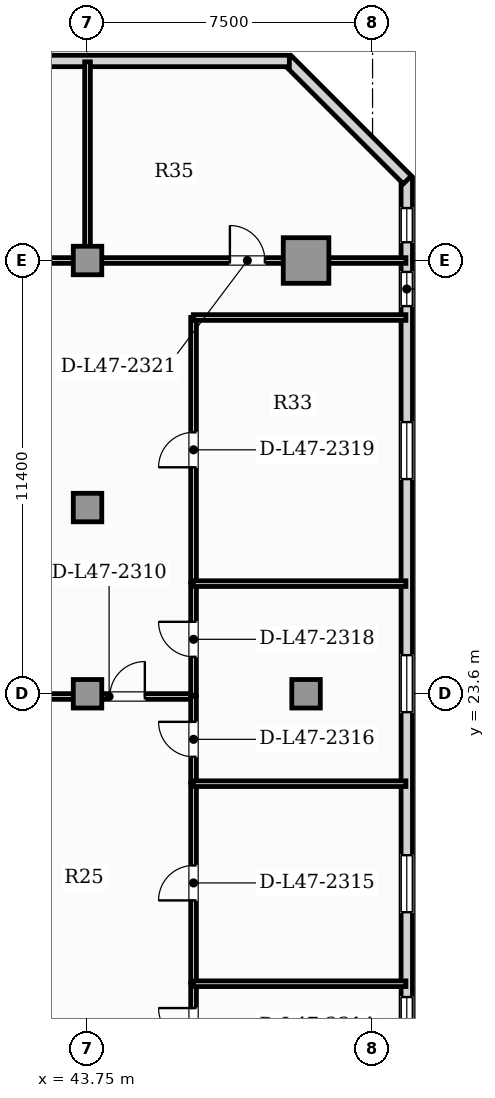
"""IFC4 building model, lengths in metres.
Left out: names, types, materials, properties, quantities, classifications, styles, units other than length and angle.
Written with IfcOpenShell. Run it as: python <this file> out.ifc"""

import sys

from ifc_helpers import new_model, si_unit, direction, frame, frame_2d, origin, origin_2d, place, context, subcontext, project, spatial, rectangle, hollow_rectangle, extrude, element, fill, save


model = new_model("IFC4")
c1 = context("Model", 3, precision=1e-05, world=origin(), true_north=direction((0.0, 1.0)))
c2 = subcontext(c1, "Body", "Model", "MODEL_VIEW")
j1 = project(units=[si_unit("LENGTHUNIT", "METRE"), si_unit("PLANEANGLEUNIT", "RADIAN")], contexts=[c1])
p1 = place(None, origin())
s1 = spatial("IfcSite", under=j1, at=p1, CompositionType="ELEMENT")
p2 = place(p1, origin())
s2 = spatial("IfcBuilding", under=s1, at=p2, CompositionType="ELEMENT")
p3 = place(p2, frame((0.0, 0.0, 192.6)))
s3 = spatial("IfcBuildingStorey", under=s2, at=p3, CompositionType="ELEMENT", Elevation=192.6)
p4 = place(p3, frame((49.5, 35.0, 0.0), z_axis=(0.0, 0.0, 1.0), x_axis=(1.0, 0.0, 0.0)))
e1 = element("IfcColumn", 1, at=p4, inside=s3, PredefinedType="USERDEFINED", context=c2, shape_type="SweptSolid", body=[
    extrude(hollow_rectangle(XDim=1.2, YDim=1.2, WallThickness=0.07, at=origin_2d()), origin(), (0.0, 0.0, 1.0), 3.85),
])
for number, where, z_axis, x_axis in (
    (2, (43.75, 23.6, 0.0), (0.0, 0.0, 1.0), (1.0, 0.0, 0.0)),
    (3, (49.5, 23.6, 0.0), (0.0, 0.0, 1.0), (1.0, 0.0, 0.0)),
    (4, (43.75, 28.5, 0.0), (0.0, 0.0, 1.0), (1.0, 0.0, 0.0)),
    (5, (43.75, 35.0, 0.0), (0.0, 0.0, 1.0), (1.0, 0.0, 0.0)),
):
    element("IfcColumn", number, at=place(p3, frame(where, z_axis=z_axis, x_axis=x_axis)), inside=s3, PredefinedType="COLUMN", context=c2, shape_type="SweptSolid", body=[
        extrude(rectangle(XDim=0.75, YDim=0.75, at=origin_2d()), origin(), (0.0, 0.0, 1.0), 3.85),
    ])
p5 = place(p3, frame((52.15, 3.24, 0.0), z_axis=(0.0, 0.0, 1.0), x_axis=(0.0, 1.0, 0.0)))
e6 = element("IfcWall", 6, at=p5, inside=s3, PredefinedType="SOLIDWALL", context=c2, shape_type="SweptSolid", body=[
    extrude(rectangle(XDim=33.92, YDim=0.3, at=frame_2d((16.96, 0.0))), origin(), (0.0, 0.0, 1.0), 3.63),
])
p6 = place(p5, frame((30.56, 0.0, 0.95)))
e7 = element("IfcOpeningElement", 7, at=p6, cuts=e6, PredefinedType="OPENING", context=c2, shape_type="SweptSolid", body=[
    extrude(rectangle(XDim=0.9, YDim=1.5, at=frame_2d((0.45, 0.75))), frame((0.0, 0.16, 0.0), z_axis=(0.0, -1.0, 0.0), x_axis=(1.0, 0.0, 0.0)), (0.0, 0.0, 1.0), 0.32),
])
p7 = place(p5, frame((10.88, 0.0, 0.9)))
e8 = element("IfcOpeningElement", 8, at=p7, cuts=e6, PredefinedType="OPENING", context=c2, shape_type="SweptSolid", body=[
    extrude(rectangle(XDim=1.5, YDim=1.95, at=frame_2d((0.75, 0.975))), frame((0.0, 0.16, 0.0), z_axis=(0.0, -1.0, 0.0), x_axis=(1.0, 0.0, 0.0)), (0.0, 0.0, 1.0), 0.32),
])
p8 = place(p5, frame((14.613, 0.0, 0.9)))
e9 = element("IfcOpeningElement", 9, at=p8, cuts=e6, PredefinedType="OPENING", context=c2, shape_type="SweptSolid", body=[
    extrude(rectangle(XDim=1.5, YDim=1.95, at=frame_2d((0.75, 0.975))), frame((0.0, 0.16, 0.0), z_axis=(0.0, -1.0, 0.0), x_axis=(1.0, 0.0, 0.0)), (0.0, 0.0, 1.0), 0.32),
])
p9 = place(p5, frame((19.876, 0.0, 0.9)))
e10 = element("IfcOpeningElement", 10, at=p9, cuts=e6, PredefinedType="OPENING", context=c2, shape_type="SweptSolid", body=[
    extrude(rectangle(XDim=1.5, YDim=1.95, at=frame_2d((0.75, 0.975))), frame((0.0, 0.16, 0.0), z_axis=(0.0, -1.0, 0.0), x_axis=(1.0, 0.0, 0.0)), (0.0, 0.0, 1.0), 0.32),
])
p10 = place(p5, frame((26.009, 0.0, 0.9)))
e11 = element("IfcOpeningElement", 11, at=p10, cuts=e6, PredefinedType="OPENING", context=c2, shape_type="SweptSolid", body=[
    extrude(rectangle(XDim=1.5, YDim=1.95, at=frame_2d((0.75, 0.975))), frame((0.0, 0.16, 0.0), z_axis=(0.0, -1.0, 0.0), x_axis=(1.0, 0.0, 0.0)), (0.0, 0.0, 1.0), 0.32),
])
p11 = place(p5, frame((32.24, 0.0, 0.95)))
e12 = element("IfcOpeningElement", 12, at=p11, cuts=e6, PredefinedType="OPENING", context=c2, shape_type="SweptSolid", body=[
    extrude(rectangle(XDim=0.9, YDim=1.5, at=frame_2d((0.45, 0.75))), frame((0.0, 0.16, 0.0), z_axis=(0.0, -1.0, 0.0), x_axis=(1.0, 0.0, 0.0)), (0.0, 0.0, 1.0), 0.32),
])
p12 = place(p3, frame((52.166, 37.122, 0.0), z_axis=(0.0, 0.0, 1.0), x_axis=(-0.707106781187, 0.707106781187, 0.0)))
e13 = element("IfcWall", 13, at=p12, inside=s3, PredefinedType="SOLIDWALL", context=c2, shape_type="SweptSolid", body=[
    extrude(rectangle(XDim=4.445, YDim=0.3, at=frame_2d((2.223, 0.0))), origin(), (0.0, 0.0, 1.0), 3.63),
])
p13 = place(p3, frame((49.06, 40.25, 0.0), z_axis=(0.0, 0.0, 1.0), x_axis=(-1.0, 0.0, 0.0)))
e14 = element("IfcWall", 14, at=p13, inside=s3, PredefinedType="SOLIDWALL", context=c2, shape_type="SweptSolid", body=[
    extrude(rectangle(XDim=12.67, YDim=0.3, at=frame_2d((6.335, 0.0))), origin(), (0.0, 0.0, 1.0), 3.63),
])
p14 = place(p13, frame((7.584, 0.0, 0.9)))
e15 = element("IfcOpeningElement", 15, at=p14, cuts=e14, PredefinedType="OPENING", context=c2, shape_type="SweptSolid", body=[
    extrude(rectangle(XDim=1.5, YDim=1.95, at=frame_2d((0.75, 0.975))), frame((0.0, 0.16, 0.0), z_axis=(0.0, -1.0, 0.0), x_axis=(1.0, 0.0, 0.0)), (0.0, 0.0, 1.0), 0.32),
])
p15 = place(p3, frame((41.555, 23.528, 0.0), z_axis=(0.0, 0.0, 1.0), x_axis=(1.0, 0.0, 0.0)))
e16 = element("IfcWall", 16, at=p15, inside=s3, PredefinedType="PARTITIONING", context=c2, shape_type="SweptSolid", body=[
    extrude(rectangle(XDim=4.99, YDim=0.15, at=frame_2d((2.495, 0.0))), origin(), (0.0, 0.0, 1.0), 3.085),
])
p16 = place(p15, frame((2.783, 0.0, 0.0)))
e17 = element("IfcOpeningElement", 17, at=p16, cuts=e16, PredefinedType="OPENING", context=c2, shape_type="SweptSolid", body=[
    extrude(rectangle(XDim=0.92, YDim=2.1, at=frame_2d((0.46, 1.05))), frame((0.0, 0.085, 0.0), z_axis=(0.0, -1.0, 0.0), x_axis=(1.0, 0.0, 0.0)), (0.0, 0.0, 1.0), 0.17),
])
p17 = place(p3, frame((46.54, 13.765, 0.0), z_axis=(0.0, 0.0, 1.0), x_axis=(0.0, 1.0, 0.0)))
e18 = element("IfcWall", 18, at=p17, inside=s3, PredefinedType="PARTITIONING", context=c2, shape_type="SweptSolid", body=[
    extrude(rectangle(XDim=2.211, YDim=0.15, at=frame_2d((1.105, 0.0))), origin(), (0.0, 0.0, 1.0), 3.63),
])
p18 = place(p17, frame((0.646, 0.0, 0.0)))
e19 = element("IfcOpeningElement", 19, at=p18, cuts=e18, PredefinedType="OPENING", context=c2, shape_type="SweptSolid", body=[
    extrude(rectangle(XDim=0.92, YDim=2.1, at=frame_2d((0.46, 1.05))), frame((0.0, 0.085, 0.0), z_axis=(0.0, -1.0, 0.0), x_axis=(1.0, 0.0, 0.0)), (0.0, 0.0, 1.0), 0.17),
])
p19 = place(p3, frame((46.54, 16.006, 0.0), z_axis=(0.0, 0.0, 1.0), x_axis=(0.0, 1.0, 0.0)))
e20 = element("IfcWall", 20, at=p19, inside=s3, PredefinedType="PARTITIONING", context=c2, shape_type="SweptSolid", body=[
    extrude(rectangle(XDim=5.234, YDim=0.15, at=frame_2d((2.617, 0.0))), origin(), (0.0, 0.0, 1.0), 3.63),
])
p20 = place(p19, frame((2.157, 0.0, 0.0)))
e21 = element("IfcOpeningElement", 21, at=p20, cuts=e20, PredefinedType="OPENING", context=c2, shape_type="SweptSolid", body=[
    extrude(rectangle(XDim=0.92, YDim=2.1, at=frame_2d((0.46, 1.05))), frame((0.0, 0.085, 0.0), z_axis=(0.0, -1.0, 0.0), x_axis=(1.0, 0.0, 0.0)), (0.0, 0.0, 1.0), 0.17),
])
p21 = place(p3, frame((46.54, 21.27, 0.0), z_axis=(0.0, 0.0, 1.0), x_axis=(0.0, 1.0, 0.0)))
e22 = element("IfcWall", 22, at=p21, inside=s3, PredefinedType="PARTITIONING", context=c2, shape_type="SweptSolid", body=[
    extrude(rectangle(XDim=2.264, YDim=0.15, at=frame_2d((1.132, 0.0))), origin(), (0.0, 0.0, 1.0), 3.63),
])
p22 = place(p21, frame((0.672, 0.0, 0.0)))
e23 = element("IfcOpeningElement", 23, at=p22, cuts=e22, PredefinedType="OPENING", context=c2, shape_type="SweptSolid", body=[
    extrude(rectangle(XDim=0.92, YDim=2.1, at=frame_2d((0.46, 1.05))), frame((0.0, 0.085, 0.0), z_axis=(0.0, -1.0, 0.0), x_axis=(1.0, 0.0, 0.0)), (0.0, 0.0, 1.0), 0.17),
])
p23 = place(p3, frame((46.54, 23.563, 0.0), z_axis=(0.0, 0.0, 1.0), x_axis=(0.0, 1.0, 0.0)))
e24 = element("IfcWall", 24, at=p23, inside=s3, PredefinedType="PARTITIONING", context=c2, shape_type="SweptSolid", body=[
    extrude(rectangle(XDim=2.94, YDim=0.15, at=frame_2d((1.47, 0.0))), origin(), (0.0, 0.0, 1.0), 3.63),
])
p24 = place(p23, frame((1.01, 0.0, 0.0)))
e25 = element("IfcOpeningElement", 25, at=p24, cuts=e24, PredefinedType="OPENING", context=c2, shape_type="SweptSolid", body=[
    extrude(rectangle(XDim=0.92, YDim=2.1, at=frame_2d((0.46, 1.05))), frame((0.0, 0.085, 0.0), z_axis=(0.0, -1.0, 0.0), x_axis=(1.0, 0.0, 0.0)), (0.0, 0.0, 1.0), 0.17),
])
p25 = place(p3, frame((46.54, 26.533, 0.0), z_axis=(0.0, 0.0, 1.0), x_axis=(0.0, 1.0, 0.0)))
e26 = element("IfcWall", 26, at=p25, inside=s3, PredefinedType="PARTITIONING", context=c2, shape_type="SweptSolid", body=[
    extrude(rectangle(XDim=6.972, YDim=0.15, at=frame_2d((3.486, 0.0))), origin(), (0.0, 0.0, 1.0), 3.63),
])
p26 = place(p25, frame((3.026, 0.0, 0.0)))
e27 = element("IfcOpeningElement", 27, at=p26, cuts=e26, PredefinedType="OPENING", context=c2, shape_type="SweptSolid", body=[
    extrude(rectangle(XDim=0.92, YDim=2.1, at=frame_2d((0.46, 1.05))), frame((0.0, 0.085, 0.0), z_axis=(0.0, -1.0, 0.0), x_axis=(1.0, 0.0, 0.0)), (0.0, 0.0, 1.0), 0.17),
])
p27 = place(p3, frame((46.535, 33.5, 0.0), z_axis=(0.0, 0.0, 1.0), x_axis=(1.0, 0.0, 0.0)))
e28 = element("IfcWall", 28, at=p27, inside=s3, PredefinedType="PARTITIONING", context=c2, shape_type="SweptSolid", body=[
    extrude(rectangle(XDim=5.593, YDim=0.15, at=frame_2d((2.796, 0.0))), origin(), (0.0, 0.0, 1.0), 3.63),
])
p28 = place(p3, frame((36.685, 35.0, 0.0), z_axis=(0.0, 0.0, 1.0), x_axis=(1.0, 0.0, 0.0)))
e29 = element("IfcWall", 29, at=p28, inside=s3, PredefinedType="PARTITIONING", context=c2, shape_type="SweptSolid", body=[
    extrude(rectangle(XDim=7.07, YDim=0.15, at=frame_2d((3.535, 0.0))), origin(), (0.0, 0.0, 1.0), 3.085),
])
p29 = place(p28, frame((3.075, 0.0, 0.0)))
e30 = element("IfcOpeningElement", 30, at=p29, cuts=e29, PredefinedType="OPENING", context=c2, shape_type="SweptSolid", body=[
    extrude(rectangle(XDim=0.92, YDim=2.1, at=frame_2d((0.46, 1.05))), frame((0.0, 0.085, 0.0), z_axis=(0.0, -1.0, 0.0), x_axis=(1.0, 0.0, 0.0)), (0.0, 0.0, 1.0), 0.17),
])
p30 = place(p3, frame((43.785, 35.0, 0.0), z_axis=(0.0, 0.0, 1.0), x_axis=(1.0, 0.0, 0.0)))
e31 = element("IfcWall", 31, at=p30, inside=s3, PredefinedType="PARTITIONING", context=c2, shape_type="SweptSolid", body=[
    extrude(rectangle(XDim=8.343, YDim=0.15, at=frame_2d((4.171, 0.0))), origin(), (0.0, 0.0, 1.0), 3.085),
])
p31 = place(p30, frame((3.711, 0.0, 0.0)))
e32 = element("IfcOpeningElement", 32, at=p31, cuts=e31, PredefinedType="OPENING", context=c2, shape_type="SweptSolid", body=[
    extrude(rectangle(XDim=0.92, YDim=2.1, at=frame_2d((0.46, 1.05))), frame((0.0, 0.085, 0.0), z_axis=(0.0, -1.0, 0.0), x_axis=(1.0, 0.0, 0.0)), (0.0, 0.0, 1.0), 0.17),
])
for number, where, z_axis, x_axis in (
    (33, (46.535, 15.971, 0.0), (0.0, 0.0, 1.0), (1.0, 0.0, 0.0)),
    (34, (46.535, 21.235, 0.0), (0.0, 0.0, 1.0), (1.0, 0.0, 0.0)),
    (35, (46.535, 26.498, 0.0), (0.0, 0.0, 1.0), (1.0, 0.0, 0.0)),
):
    element("IfcWall", number, at=place(p3, frame(where, z_axis=z_axis, x_axis=x_axis)), inside=s3, PredefinedType="PARTITIONING", context=c2, shape_type="SweptSolid", body=[
        extrude(rectangle(XDim=5.593, YDim=0.15, at=frame_2d((2.796, 0.0))), origin(), (0.0, 0.0, 1.0), 3.63),
    ])
p32 = place(p3, frame((43.75, 34.995, 0.0), z_axis=(0.0, 0.0, 1.0), x_axis=(0.0, 1.0, 0.0)))
e36 = element("IfcWall", 36, at=p32, inside=s3, PredefinedType="PARTITIONING", context=c2, shape_type="SweptSolid", body=[
    extrude(rectangle(XDim=5.232, YDim=0.15, at=frame_2d((2.616, 0.0))), origin(), (0.0, 0.0, 1.0), 3.63),
])
p33 = place(p6, origin())
e37 = element("IfcWindow", 37, at=p33, inside=s3, PartitioningType="SINGLE_PANEL", PredefinedType="WINDOW", context=c2, shape_type="SweptSolid", body=[
    extrude(rectangle(XDim=0.9, YDim=1.5, at=frame_2d((0.45, 0.75))), frame((0.0, 0.03, 0.0), z_axis=(0.0, -1.0, 0.0), x_axis=(1.0, 0.0, 0.0)), (0.0, 0.0, 1.0), 0.06),
])
fill(e7, e37)
p34 = place(p7, origin())
e38 = element("IfcWindow", 38, at=p34, inside=s3, PartitioningType="SINGLE_PANEL", PredefinedType="WINDOW", context=c2, shape_type="SweptSolid", body=[
    extrude(rectangle(XDim=1.5, YDim=1.95, at=frame_2d((0.75, 0.975))), frame((0.0, 0.03, 0.0), z_axis=(0.0, -1.0, 0.0), x_axis=(1.0, 0.0, 0.0)), (0.0, 0.0, 1.0), 0.06),
])
fill(e8, e38)
p35 = place(p8, origin())
e39 = element("IfcWindow", 39, at=p35, inside=s3, PartitioningType="SINGLE_PANEL", PredefinedType="WINDOW", context=c2, shape_type="SweptSolid", body=[
    extrude(rectangle(XDim=1.5, YDim=1.95, at=frame_2d((0.75, 0.975))), frame((0.0, 0.03, 0.0), z_axis=(0.0, -1.0, 0.0), x_axis=(1.0, 0.0, 0.0)), (0.0, 0.0, 1.0), 0.06),
])
fill(e9, e39)
p36 = place(p9, origin())
e40 = element("IfcWindow", 40, at=p36, inside=s3, PartitioningType="SINGLE_PANEL", PredefinedType="WINDOW", context=c2, shape_type="SweptSolid", body=[
    extrude(rectangle(XDim=1.5, YDim=1.95, at=frame_2d((0.75, 0.975))), frame((0.0, 0.03, 0.0), z_axis=(0.0, -1.0, 0.0), x_axis=(1.0, 0.0, 0.0)), (0.0, 0.0, 1.0), 0.06),
])
fill(e10, e40)
p37 = place(p10, origin())
e41 = element("IfcWindow", 41, at=p37, inside=s3, PartitioningType="SINGLE_PANEL", PredefinedType="WINDOW", context=c2, shape_type="SweptSolid", body=[
    extrude(rectangle(XDim=1.5, YDim=1.95, at=frame_2d((0.75, 0.975))), frame((0.0, 0.03, 0.0), z_axis=(0.0, -1.0, 0.0), x_axis=(1.0, 0.0, 0.0)), (0.0, 0.0, 1.0), 0.06),
])
fill(e11, e41)
p38 = place(p11, origin())
e42 = element("IfcWindow", 42, at=p38, inside=s3, PartitioningType="SINGLE_PANEL", PredefinedType="WINDOW", context=c2, shape_type="SweptSolid", body=[
    extrude(rectangle(XDim=0.9, YDim=1.5, at=frame_2d((0.45, 0.75))), frame((0.0, 0.03, 0.0), z_axis=(0.0, -1.0, 0.0), x_axis=(1.0, 0.0, 0.0)), (0.0, 0.0, 1.0), 0.06),
])
fill(e12, e42)
p39 = place(p16, origin())
e43 = element("IfcDoor", 43, at=p39, inside=s3, OperationType="SINGLE_SWING_RIGHT", PredefinedType="DOOR", context=c2, shape_type="SweptSolid", body=[
    extrude(rectangle(XDim=0.92, YDim=2.1, at=frame_2d((0.46, 1.05))), frame((0.0, 0.025, 0.0), z_axis=(0.0, -1.0, 0.0), x_axis=(1.0, 0.0, 0.0)), (0.0, 0.0, 1.0), 0.05),
])
fill(e17, e43)
p40 = place(p18, origin())
e44 = element("IfcDoor", 44, at=p40, inside=s3, OperationType="SINGLE_SWING_RIGHT", PredefinedType="DOOR", context=c2, shape_type="SweptSolid", body=[
    extrude(rectangle(XDim=0.92, YDim=2.1, at=frame_2d((0.46, 1.05))), frame((0.0, 0.025, 0.0), z_axis=(0.0, -1.0, 0.0), x_axis=(1.0, 0.0, 0.0)), (0.0, 0.0, 1.0), 0.05),
])
fill(e19, e44)
p41 = place(p20, origin())
e45 = element("IfcDoor", 45, at=p41, inside=s3, OperationType="SINGLE_SWING_LEFT", PredefinedType="DOOR", context=c2, shape_type="SweptSolid", body=[
    extrude(rectangle(XDim=0.92, YDim=2.1, at=frame_2d((0.46, 1.05))), frame((0.0, 0.025, 0.0), z_axis=(0.0, -1.0, 0.0), x_axis=(1.0, 0.0, 0.0)), (0.0, 0.0, 1.0), 0.05),
])
fill(e21, e45)
p42 = place(p22, origin())
e46 = element("IfcDoor", 46, at=p42, inside=s3, OperationType="SINGLE_SWING_RIGHT", PredefinedType="DOOR", context=c2, shape_type="SweptSolid", body=[
    extrude(rectangle(XDim=0.92, YDim=2.1, at=frame_2d((0.46, 1.05))), frame((0.0, 0.025, 0.0), z_axis=(0.0, -1.0, 0.0), x_axis=(1.0, 0.0, 0.0)), (0.0, 0.0, 1.0), 0.05),
])
fill(e23, e46)
p43 = place(p24, origin())
e47 = element("IfcDoor", 47, at=p43, inside=s3, OperationType="SINGLE_SWING_RIGHT", PredefinedType="DOOR", context=c2, shape_type="SweptSolid", body=[
    extrude(rectangle(XDim=0.92, YDim=2.1, at=frame_2d((0.46, 1.05))), frame((0.0, 0.025, 0.0), z_axis=(0.0, -1.0, 0.0), x_axis=(1.0, 0.0, 0.0)), (0.0, 0.0, 1.0), 0.05),
])
fill(e25, e47)
p44 = place(p26, origin())
e48 = element("IfcDoor", 48, at=p44, inside=s3, OperationType="SINGLE_SWING_LEFT", PredefinedType="DOOR", context=c2, shape_type="SweptSolid", body=[
    extrude(rectangle(XDim=0.92, YDim=2.1, at=frame_2d((0.46, 1.05))), frame((0.0, 0.025, 0.0), z_axis=(0.0, -1.0, 0.0), x_axis=(1.0, 0.0, 0.0)), (0.0, 0.0, 1.0), 0.05),
])
fill(e27, e48)
p45 = place(p31, origin())
e49 = element("IfcDoor", 49, at=p45, inside=s3, OperationType="SINGLE_SWING_LEFT", PredefinedType="DOOR", context=c2, shape_type="SweptSolid", body=[
    extrude(rectangle(XDim=0.92, YDim=2.1, at=frame_2d((0.46, 1.05))), frame((0.0, 0.025, 0.0), z_axis=(0.0, -1.0, 0.0), x_axis=(1.0, 0.0, 0.0)), (0.0, 0.0, 1.0), 0.05),
])
fill(e32, e49)
save(model, sys.argv[1])
